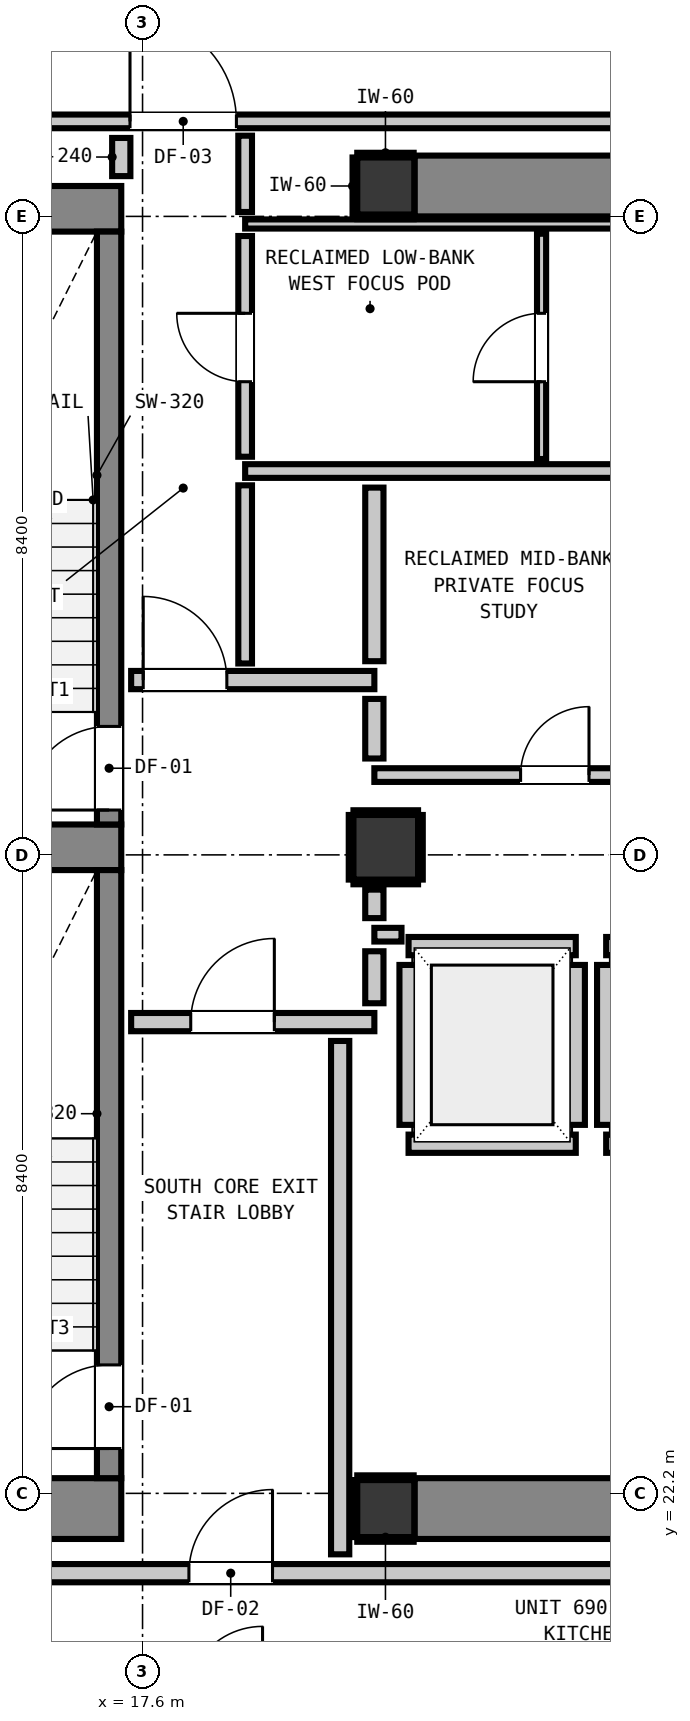
"""IFC4 building model, lengths in metres.
Left out: names, types, materials, properties, quantities, classifications, styles, units other than length and angle.
Written with IfcOpenShell. Run it as: python <this file> out.ifc"""

import sys

from ifc_helpers import new_model, si_unit, direction, frame, frame_2d, origin, origin_2d, place, context, subcontext, project, spatial, rectangle, extrude, element, fill, save


model = new_model("IFC4")
c1 = context("Model", 3, precision=1e-05, world=origin(), true_north=direction((0.0, 1.0)))
c2 = subcontext(c1, "Body", "Model", "MODEL_VIEW")
j1 = project(units=[si_unit("LENGTHUNIT", "METRE"), si_unit("PLANEANGLEUNIT", "RADIAN")], contexts=[c1])
p1 = place(None, origin())
s1 = spatial("IfcSite", under=j1, at=p1, CompositionType="ELEMENT")
p2 = place(p1, origin())
s2 = spatial("IfcBuilding", under=s1, at=p2, CompositionType="ELEMENT")
p3 = place(p2, frame((0.0, 0.0, 237.92)))
s3 = spatial("IfcBuildingStorey", under=s2, at=p3, CompositionType="ELEMENT", Elevation=237.92)
for number, where, z_axis, x_axis in (
    (1, (20.8, 22.0, 0.0), (0.0, 0.0, 1.0), (1.0, 0.0, 0.0)),
    (2, (20.8, 39.4, 0.0), (0.0, 0.0, 1.0), (1.0, 0.0, 0.0)),
):
    element("IfcColumn", number, at=place(p3, frame(where, z_axis=z_axis, x_axis=x_axis)), inside=s3, PredefinedType="COLUMN", context=c2, shape_type="SweptSolid", body=[
        extrude(rectangle(XDim=0.75, YDim=0.75, at=origin_2d()), origin(), (0.0, 0.0, 1.0), 3.32),
    ])
p4 = place(p3, frame((13.24, 22.0, 0.0), z_axis=(0.0, 0.0, 1.0), x_axis=(1.0, 0.0, 0.0)))
e3 = element("IfcWall", 3, at=p4, inside=s3, PredefinedType="SHEAR", context=c2, shape_type="SweptSolid", body=[
    extrude(rectangle(XDim=4.08, YDim=0.8, at=frame_2d((2.04, 0.0))), origin(), (0.0, 0.0, 1.0), 3.32),
])
p5 = place(p3, frame((13.24, 39.1, 0.0), z_axis=(0.0, 0.0, 1.0), x_axis=(1.0, 0.0, 0.0)))
e4 = element("IfcWall", 4, at=p5, inside=s3, PredefinedType="SHEAR", context=c2, shape_type="SweptSolid", body=[
    extrude(rectangle(XDim=4.08, YDim=0.6, at=frame_2d((2.04, 0.0))), origin(), (0.0, 0.0, 1.0), 3.32),
])
p6 = place(p3, frame((13.78, 30.7, 0.0), z_axis=(0.0, 0.0, 1.0), x_axis=(1.0, 0.0, 0.0)))
e5 = element("IfcWall", 5, at=p6, inside=s3, PredefinedType="SHEAR", context=c2, shape_type="SweptSolid", body=[
    extrude(rectangle(XDim=3.54, YDim=0.6, at=frame_2d((1.77, 0.0))), origin(), (0.0, 0.0, 1.0), 3.32),
])
for number, where, z_axis, x_axis in (
    (6, (21.18, 22.0, 0.0), (0.0, 0.0, 1.0), (1.0, 0.0, 0.0)),
    (7, (21.18, 39.4, 0.0), (0.0, 0.0, 1.0), (1.0, 0.0, 0.0)),
):
    element("IfcWall", number, at=place(p3, frame(where, z_axis=z_axis, x_axis=x_axis)), inside=s3, PredefinedType="SHEAR", context=c2, shape_type="SweptSolid", body=[
        extrude(rectangle(XDim=7.64, YDim=0.8, at=frame_2d((3.82, 0.0))), origin(), (0.0, 0.0, 1.0), 3.32),
    ])
p7 = place(p3, frame((17.16, 31.0, 0.0), z_axis=(0.0, 0.0, 1.0), x_axis=(0.0, 1.0, 0.0)))
e8 = element("IfcWall", 8, at=p7, inside=s3, PredefinedType="SHEAR", context=c2, shape_type="SweptSolid", body=[
    extrude(rectangle(XDim=7.8, YDim=0.32, at=frame_2d((3.9, 0.0))), origin(), (0.0, 0.0, 1.0), 3.32),
])
p8 = place(p7, frame((0.19, 0.0, 0.0)))
e9 = element("IfcOpeningElement", 9, at=p8, cuts=e8, PredefinedType="OPENING", context=c2, shape_type="SweptSolid", body=[
    extrude(rectangle(XDim=1.1, YDim=2.15, at=frame_2d((0.55, 1.075))), frame((0.0, 0.17, 0.0), z_axis=(0.0, -1.0, 0.0), x_axis=(1.0, 0.0, 0.0)), (0.0, 0.0, 1.0), 0.34),
])
p9 = place(p3, frame((17.16, 22.4, 0.0), z_axis=(0.0, 0.0, 1.0), x_axis=(0.0, 1.0, 0.0)))
e10 = element("IfcWall", 10, at=p9, inside=s3, PredefinedType="SHEAR", context=c2, shape_type="SweptSolid", body=[
    extrude(rectangle(XDim=8.0, YDim=0.32, at=frame_2d((4.0, 0.0))), origin(), (0.0, 0.0, 1.0), 3.32),
])
p10 = place(p9, frame((0.39, 0.0, 0.0)))
e11 = element("IfcOpeningElement", 11, at=p10, cuts=e10, PredefinedType="OPENING", context=c2, shape_type="SweptSolid", body=[
    extrude(rectangle(XDim=1.1, YDim=2.15, at=frame_2d((0.55, 1.075))), frame((0.0, 0.17, 0.0), z_axis=(0.0, -1.0, 0.0), x_axis=(1.0, 0.0, 0.0)), (0.0, 0.0, 1.0), 0.34),
])
p11 = place(p3, frame((20.8, 30.7, 0.0), z_axis=(0.0, 0.0, 1.0), x_axis=(1.0, 0.0, 0.0)))
e12 = element("IfcColumn", 12, at=p11, inside=s3, PredefinedType="COLUMN", context=c2, shape_type="SweptSolid", body=[
    extrude(rectangle(XDim=0.85, YDim=0.85, at=origin_2d()), origin(), (0.0, 0.0, 1.0), 3.32),
])
for number, where, z_axis, x_axis in (
    (13, (21.1, 26.8, 0.0), (0.0, 0.0, 1.0), (1.0, 0.0, 0.0)),
    (14, (21.1, 29.4, 0.0), (0.0, 0.0, 1.0), (1.0, 0.0, 0.0)),
):
    element("IfcWall", number, at=place(p3, frame(where, z_axis=z_axis, x_axis=x_axis)), inside=s3, PredefinedType="PARTITIONING", context=c2, shape_type="SweptSolid", body=[
        extrude(rectangle(XDim=2.2, YDim=0.24, at=frame_2d((1.1, 0.0))), origin(), (0.0, 0.0, 1.0), 3.1),
    ])
p12 = place(p3, frame((21.1, 27.048, 0.0), z_axis=(0.0, 0.0, 1.0), x_axis=(0.0, 1.0, 0.0)))
e15 = element("IfcWall", 15, at=p12, inside=s3, PredefinedType="PARTITIONING", context=c2, shape_type="SweptSolid", body=[
    extrude(rectangle(XDim=2.104, YDim=0.24, at=frame_2d((1.052, 0.0))), origin(), (0.0, 0.0, 1.0), 2.335),
])
p13 = place(p3, frame((23.3, 27.048, 0.0), z_axis=(0.0, 0.0, 1.0), x_axis=(0.0, 1.0, 0.0)))
e16 = element("IfcWall", 16, at=p13, inside=s3, PredefinedType="PARTITIONING", context=c2, shape_type="SweptSolid", body=[
    extrude(rectangle(XDim=2.104, YDim=0.24, at=frame_2d((1.052, 0.0))), origin(), (0.0, 0.0, 1.0), 3.1),
])
for number, where, z_axis, x_axis in (
    (17, (23.7, 26.8, 0.0), (0.0, 0.0, 1.0), (1.0, 0.0, 0.0)),
    (18, (23.7, 29.4, 0.0), (0.0, 0.0, 1.0), (1.0, 0.0, 0.0)),
):
    element("IfcWall", number, at=place(p3, frame(where, z_axis=z_axis, x_axis=x_axis)), inside=s3, PredefinedType="PARTITIONING", context=c2, shape_type="SweptSolid", body=[
        extrude(rectangle(XDim=2.2, YDim=0.24, at=frame_2d((1.1, 0.0))), origin(), (0.0, 0.0, 1.0), 3.1),
    ])
p14 = place(p3, frame((23.7, 27.048, 0.0), z_axis=(0.0, 0.0, 1.0), x_axis=(0.0, 1.0, 0.0)))
e19 = element("IfcWall", 19, at=p14, inside=s3, PredefinedType="PARTITIONING", context=c2, shape_type="SweptSolid", body=[
    extrude(rectangle(XDim=2.104, YDim=0.24, at=frame_2d((1.052, 0.0))), origin(), (0.0, 0.0, 1.0), 3.1),
])
p15 = place(p3, frame((10.787, 21.15, 0.0), z_axis=(0.0, 0.0, 1.0), x_axis=(1.0, 0.0, 0.0)))
e20 = element("IfcWall", 20, at=p15, inside=s3, PredefinedType="PARTITIONING", context=c2, shape_type="SweptSolid", body=[
    extrude(rectangle(XDim=26.102, YDim=0.24, at=frame_2d((13.051, 0.0))), origin(), (0.0, 0.0, 1.0), 3.1),
])
p16 = place(p15, frame((7.423, 0.0, 0.0)))
e21 = element("IfcOpeningElement", 21, at=p16, cuts=e20, PredefinedType="OPENING", context=c2, shape_type="SweptSolid", body=[
    extrude(rectangle(XDim=1.1, YDim=2.15, at=frame_2d((0.55, 1.075))), frame((0.0, 0.13, 0.0), z_axis=(0.0, -1.0, 0.0), x_axis=(1.0, 0.0, 0.0)), (0.0, 0.0, 1.0), 0.26),
])
p17 = place(p3, frame((17.45, 28.4, 0.0), z_axis=(0.0, 0.0, 1.0), x_axis=(1.0, 0.0, 0.0)))
e22 = element("IfcWall", 22, at=p17, inside=s3, PredefinedType="PARTITIONING", context=c2, shape_type="SweptSolid", body=[
    extrude(rectangle(XDim=3.2, YDim=0.24, at=frame_2d((1.6, 0.0))), origin(), (0.0, 0.0, 1.0), 3.1),
])
p18 = place(p17, frame((0.784, 0.0, 0.0)))
e23 = element("IfcOpeningElement", 23, at=p18, cuts=e22, PredefinedType="OPENING", context=c2, shape_type="SweptSolid", body=[
    extrude(rectangle(XDim=1.1, YDim=2.15, at=frame_2d((0.55, 1.075))), frame((0.0, 0.13, 0.0), z_axis=(0.0, -1.0, 0.0), x_axis=(1.0, 0.0, 0.0)), (0.0, 0.0, 1.0), 0.26),
])
p19 = place(p3, frame((17.45, 32.9, 0.0), z_axis=(0.0, 0.0, 1.0), x_axis=(1.0, 0.0, 0.0)))
e24 = element("IfcWall", 24, at=p19, inside=s3, PredefinedType="PARTITIONING", context=c2, shape_type="SweptSolid", body=[
    extrude(rectangle(XDim=3.2, YDim=0.24, at=frame_2d((1.6, 0.0))), origin(), (0.0, 0.0, 1.0), 3.1),
])
p20 = place(p19, frame((0.159, 0.0, 0.0)))
e25 = element("IfcOpeningElement", 25, at=p20, cuts=e24, PredefinedType="OPENING", context=c2, shape_type="SweptSolid", body=[
    extrude(rectangle(XDim=1.1, YDim=2.15, at=frame_2d((0.55, 1.075))), frame((0.0, 0.13, 0.0), z_axis=(0.0, -1.0, 0.0), x_axis=(1.0, 0.0, 0.0)), (0.0, 0.0, 1.0), 0.26),
])
p21 = place(p3, frame((20.65, 29.55, 0.0), z_axis=(0.0, 0.0, 1.0), x_axis=(1.0, 0.0, 0.0)))
e26 = element("IfcWall", 26, at=p21, inside=s3, PredefinedType="PARTITIONING", context=c2, shape_type="SweptSolid", body=[
    extrude(rectangle(XDim=0.357, YDim=0.18, at=frame_2d((0.179, 0.0))), origin(), (0.0, 0.0, 1.0), 3.1),
])
p22 = place(p3, frame((20.65, 31.65, 0.0), z_axis=(0.0, 0.0, 1.0), x_axis=(1.0, 0.0, 0.0)))
e27 = element("IfcWall", 27, at=p22, inside=s3, PredefinedType="PARTITIONING", context=c2, shape_type="SweptSolid", body=[
    extrude(rectangle(XDim=7.7, YDim=0.18, at=frame_2d((3.85, 0.0))), origin(), (0.0, 0.0, 1.0), 3.1),
])
p23 = place(p22, frame((1.924, 0.0, 0.0)))
e28 = element("IfcOpeningElement", 28, at=p23, cuts=e27, PredefinedType="OPENING", context=c2, shape_type="SweptSolid", body=[
    extrude(rectangle(XDim=0.9, YDim=2.1, at=frame_2d((0.45, 1.05))), frame((0.0, 0.1, 0.0), z_axis=(0.0, -1.0, 0.0), x_axis=(1.0, 0.0, 0.0)), (0.0, 0.0, 1.0), 0.2),
])
p24 = place(p3, frame((18.95, 35.65, 0.0), z_axis=(0.0, 0.0, 1.0), x_axis=(1.0, 0.0, 0.0)))
e29 = element("IfcWall", 29, at=p24, inside=s3, PredefinedType="PARTITIONING", context=c2, shape_type="SweptSolid", body=[
    extrude(rectangle(XDim=11.025, YDim=0.18, at=frame_2d((5.513, 0.0))), origin(), (0.0, 0.0, 1.0), 3.1),
])
p25 = place(p3, frame((10.787, 40.25, 0.0), z_axis=(0.0, 0.0, 1.0), x_axis=(1.0, 0.0, 0.0)))
e30 = element("IfcWall", 30, at=p25, inside=s3, PredefinedType="PARTITIONING", context=c2, shape_type="SweptSolid", body=[
    extrude(rectangle(XDim=36.626, YDim=0.18, at=frame_2d((18.313, 0.0))), origin(), (0.0, 0.0, 1.0), 3.1),
])
p26 = place(p25, frame((6.648, 0.0, 0.0)))
e31 = element("IfcOpeningElement", 31, at=p26, cuts=e30, PredefinedType="OPENING", context=c2, shape_type="SweptSolid", body=[
    extrude(rectangle(XDim=1.4, YDim=2.15, at=frame_2d((0.7, 1.075))), frame((0.0, 0.1, 0.0), z_axis=(0.0, -1.0, 0.0), x_axis=(1.0, 0.0, 0.0)), (0.0, 0.0, 1.0), 0.2),
])
p27 = place(p25, frame((31.482, 0.0, 0.0)))
e32 = element("IfcOpeningElement", 32, at=p27, cuts=e30, PredefinedType="OPENING", context=c2, shape_type="SweptSolid", body=[
    extrude(rectangle(XDim=1.0, YDim=2.15, at=frame_2d((0.5, 1.075))), frame((0.0, 0.1, 0.0), z_axis=(0.0, -1.0, 0.0), x_axis=(1.0, 0.0, 0.0)), (0.0, 0.0, 1.0), 0.2),
])
p28 = place(p3, frame((18.95, 38.9, 0.0), z_axis=(0.0, 0.0, 1.0), x_axis=(1.0, 0.0, 0.0)))
e33 = element("IfcWall", 33, at=p28, inside=s3, PredefinedType="PARTITIONING", context=c2, shape_type="SweptSolid", body=[
    extrude(rectangle(XDim=11.025, YDim=0.12, at=frame_2d((5.513, 0.0))), origin(), (0.0, 0.0, 1.0), 3.1),
])
p29 = place(p3, frame((17.32, 39.53, 0.0), z_axis=(0.0, 0.0, 1.0), x_axis=(0.0, 1.0, 0.0)))
e34 = element("IfcWall", 34, at=p29, inside=s3, PredefinedType="PARTITIONING", context=c2, shape_type="SweptSolid", body=[
    extrude(rectangle(XDim=0.502, YDim=0.24, at=frame_2d((0.251, 0.0))), origin(), (0.0, 0.0, 1.0), 3.1),
])
p30 = place(p3, frame((20.2, 21.398, 0.0), z_axis=(0.0, 0.0, 1.0), x_axis=(0.0, 1.0, 0.0)))
e35 = element("IfcWall", 35, at=p30, inside=s3, PredefinedType="PARTITIONING", context=c2, shape_type="SweptSolid", body=[
    extrude(rectangle(XDim=6.754, YDim=0.24, at=frame_2d((3.377, 0.0))), origin(), (0.0, 0.0, 1.0), 3.1),
])
p31 = place(p3, frame((20.65, 28.648, 0.0), z_axis=(0.0, 0.0, 1.0), x_axis=(0.0, 1.0, 0.0)))
e36 = element("IfcWall", 36, at=p31, inside=s3, PredefinedType="PARTITIONING", context=c2, shape_type="SweptSolid", body=[
    extrude(rectangle(XDim=0.684, YDim=0.24, at=frame_2d((0.342, 0.0))), origin(), (0.0, 0.0, 1.0), 2.335),
])
p32 = place(p3, frame((20.65, 29.768, 0.0), z_axis=(0.0, 0.0, 1.0), x_axis=(0.0, 1.0, 0.0)))
e37 = element("IfcWall", 37, at=p32, inside=s3, PredefinedType="PARTITIONING", context=c2, shape_type="SweptSolid", body=[
    extrude(rectangle(XDim=0.375, YDim=0.24, at=frame_2d((0.188, 0.0))), origin(), (0.0, 0.0, 1.0), 2.335),
])
p33 = place(p3, frame((20.65, 31.868, 0.0), z_axis=(0.0, 0.0, 1.0), x_axis=(0.0, 1.0, 0.0)))
e38 = element("IfcWall", 38, at=p33, inside=s3, PredefinedType="PARTITIONING", context=c2, shape_type="SweptSolid", body=[
    extrude(rectangle(XDim=0.784, YDim=0.24, at=frame_2d((0.392, 0.0))), origin(), (0.0, 0.0, 1.0), 2.335),
])
p34 = place(p3, frame((20.65, 33.148, 0.0), z_axis=(0.0, 0.0, 1.0), x_axis=(0.0, 1.0, 0.0)))
e39 = element("IfcWall", 39, at=p34, inside=s3, PredefinedType="PARTITIONING", context=c2, shape_type="SweptSolid", body=[
    extrude(rectangle(XDim=2.284, YDim=0.24, at=frame_2d((1.142, 0.0))), origin(), (0.0, 0.0, 1.0), 2.335),
])
p35 = place(p3, frame((18.95, 33.118, 0.0), z_axis=(0.0, 0.0, 1.0), x_axis=(0.0, 1.0, 0.0)))
e40 = element("IfcWall", 40, at=p35, inside=s3, PredefinedType="PARTITIONING", context=c2, shape_type="SweptSolid", body=[
    extrude(rectangle(XDim=2.344, YDim=0.18, at=frame_2d((1.172, 0.0))), origin(), (0.0, 0.0, 1.0), 3.1),
])
p36 = place(p3, frame((18.95, 35.838, 0.0), z_axis=(0.0, 0.0, 1.0), x_axis=(0.0, 1.0, 0.0)))
e41 = element("IfcWall", 41, at=p36, inside=s3, PredefinedType="PARTITIONING", context=c2, shape_type="SweptSolid", body=[
    extrude(rectangle(XDim=2.904, YDim=0.18, at=frame_2d((1.452, 0.0))), origin(), (0.0, 0.0, 1.0), 3.1),
])
p37 = place(p36, frame((0.987, 0.0, 0.0)))
e42 = element("IfcOpeningElement", 42, at=p37, cuts=e41, PredefinedType="OPENING", context=c2, shape_type="SweptSolid", body=[
    extrude(rectangle(XDim=0.9, YDim=2.1, at=frame_2d((0.45, 1.05))), frame((0.0, 0.1, 0.0), z_axis=(0.0, -1.0, 0.0), x_axis=(1.0, 0.0, 0.0)), (0.0, 0.0, 1.0), 0.2),
])
p38 = place(p3, frame((18.95, 39.058, 0.0), z_axis=(0.0, 0.0, 1.0), x_axis=(0.0, 1.0, 0.0)))
e43 = element("IfcWall", 43, at=p38, inside=s3, PredefinedType="PARTITIONING", context=c2, shape_type="SweptSolid", body=[
    extrude(rectangle(XDim=1.004, YDim=0.18, at=frame_2d((0.502, 0.0))), origin(), (0.0, 0.0, 1.0), 3.1),
])
p39 = place(p3, frame((22.85, 35.808, 0.0), z_axis=(0.0, 0.0, 1.0), x_axis=(0.0, 1.0, 0.0)))
e44 = element("IfcWall", 44, at=p39, inside=s3, PredefinedType="PARTITIONING", context=c2, shape_type="SweptSolid", body=[
    extrude(rectangle(XDim=2.964, YDim=0.12, at=frame_2d((1.482, 0.0))), origin(), (0.0, 0.0, 1.0), 3.1),
])
p40 = place(p39, frame((1.017, 0.0, 0.0)))
e45 = element("IfcOpeningElement", 45, at=p40, cuts=e44, PredefinedType="OPENING", context=c2, shape_type="SweptSolid", body=[
    extrude(rectangle(XDim=0.9, YDim=2.1, at=frame_2d((0.45, 1.05))), frame((0.0, 0.07, 0.0), z_axis=(0.0, -1.0, 0.0), x_axis=(1.0, 0.0, 0.0)), (0.0, 0.0, 1.0), 0.14),
])
for number, where, z_axis, x_axis in (
    (46, (20.425, 21.593, 0.0), (0.0, 0.0, 1.0), (1.0, 0.0, 0.0)),
    (47, (20.425, 22.407, 0.0), (0.0, 0.0, 1.0), (1.0, 0.0, 0.0)),
):
    element("IfcWall", number, at=place(p3, frame(where, z_axis=z_axis, x_axis=x_axis)), inside=s3, PredefinedType="PARTITIONING", context=c2, shape_type="SweptSolid", body=[
        extrude(rectangle(XDim=0.742, YDim=0.06, at=frame_2d((0.371, 0.0))), origin(), (0.0, 0.0, 1.0), 1.45),
    ])
p41 = place(p3, frame((20.393, 21.625, 0.0), z_axis=(0.0, 0.0, 1.0), x_axis=(0.0, 1.0, 0.0)))
e48 = element("IfcWall", 48, at=p41, inside=s3, PredefinedType="PARTITIONING", context=c2, shape_type="SweptSolid", body=[
    extrude(rectangle(XDim=0.75, YDim=0.06, at=frame_2d((0.375, 0.0))), origin(), (0.0, 0.0, 1.0), 1.45),
])
for number, where, z_axis, x_axis in (
    (49, (20.425, 38.993, 0.0), (0.0, 0.0, 1.0), (1.0, 0.0, 0.0)),
    (50, (20.425, 39.807, 0.0), (0.0, 0.0, 1.0), (1.0, 0.0, 0.0)),
):
    element("IfcWall", number, at=place(p3, frame(where, z_axis=z_axis, x_axis=x_axis)), inside=s3, PredefinedType="PARTITIONING", context=c2, shape_type="SweptSolid", body=[
        extrude(rectangle(XDim=0.742, YDim=0.06, at=frame_2d((0.371, 0.0))), origin(), (0.0, 0.0, 1.0), 1.45),
    ])
p42 = place(p3, frame((20.393, 39.025, 0.0), z_axis=(0.0, 0.0, 1.0), x_axis=(0.0, 1.0, 0.0)))
e51 = element("IfcWall", 51, at=p42, inside=s3, PredefinedType="PARTITIONING", context=c2, shape_type="SweptSolid", body=[
    extrude(rectangle(XDim=0.75, YDim=0.06, at=frame_2d((0.375, 0.0))), origin(), (0.0, 0.0, 1.0), 1.45),
])
for number, where, z_axis, x_axis in (
    (52, (20.375, 30.243, 0.0), (0.0, 0.0, 1.0), (1.0, 0.0, 0.0)),
    (53, (20.375, 31.157, 0.0), (0.0, 0.0, 1.0), (1.0, 0.0, 0.0)),
    (54, (20.343, 30.275, 0.0), (0.0, 0.0, 1.0), (0.0, 1.0, 0.0)),
    (55, (21.257, 30.275, 0.0), (0.0, 0.0, 1.0), (0.0, 1.0, 0.0)),
):
    element("IfcWall", number, at=place(p3, frame(where, z_axis=z_axis, x_axis=x_axis)), inside=s3, PredefinedType="PARTITIONING", context=c2, shape_type="SweptSolid", body=[
        extrude(rectangle(XDim=0.85, YDim=0.06, at=frame_2d((0.425, 0.0))), origin(), (0.0, 0.0, 1.0), 1.45),
    ])
p43 = place(p8, origin())
e56 = element("IfcDoor", 56, at=p43, inside=s3, OperationType="SINGLE_SWING_LEFT", PredefinedType="DOOR", context=c2, shape_type="SweptSolid", body=[
    extrude(rectangle(XDim=1.1, YDim=2.15, at=frame_2d((0.55, 1.075))), frame((0.0, 0.025, 0.0), z_axis=(0.0, -1.0, 0.0), x_axis=(1.0, 0.0, 0.0)), (0.0, 0.0, 1.0), 0.05),
])
fill(e9, e56)
p44 = place(p10, origin())
e57 = element("IfcDoor", 57, at=p44, inside=s3, OperationType="SINGLE_SWING_LEFT", PredefinedType="DOOR", context=c2, shape_type="SweptSolid", body=[
    extrude(rectangle(XDim=1.1, YDim=2.15, at=frame_2d((0.55, 1.075))), frame((0.0, 0.025, 0.0), z_axis=(0.0, -1.0, 0.0), x_axis=(1.0, 0.0, 0.0)), (0.0, 0.0, 1.0), 0.05),
])
fill(e11, e57)
p45 = place(p18, origin())
e58 = element("IfcDoor", 58, at=p45, inside=s3, OperationType="SINGLE_SWING_RIGHT", PredefinedType="DOOR", context=c2, shape_type="SweptSolid", body=[
    extrude(rectangle(XDim=1.1, YDim=2.15, at=frame_2d((0.55, 1.075))), frame((0.0, 0.025, 0.0), z_axis=(0.0, -1.0, 0.0), x_axis=(1.0, 0.0, 0.0)), (0.0, 0.0, 1.0), 0.05),
])
fill(e23, e58)
p46 = place(p20, origin())
e59 = element("IfcDoor", 59, at=p46, inside=s3, OperationType="SINGLE_SWING_LEFT", PredefinedType="DOOR", context=c2, shape_type="SweptSolid", body=[
    extrude(rectangle(XDim=1.1, YDim=2.15, at=frame_2d((0.55, 1.075))), frame((0.0, 0.025, 0.0), z_axis=(0.0, -1.0, 0.0), x_axis=(1.0, 0.0, 0.0)), (0.0, 0.0, 1.0), 0.05),
])
fill(e25, e59)
p47 = place(p16, origin())
e60 = element("IfcDoor", 60, at=p47, inside=s3, OperationType="SINGLE_SWING_RIGHT", PredefinedType="DOOR", context=c2, shape_type="SweptSolid", body=[
    extrude(rectangle(XDim=1.1, YDim=2.15, at=frame_2d((0.55, 1.075))), frame((0.0, 0.025, 0.0), z_axis=(0.0, -1.0, 0.0), x_axis=(1.0, 0.0, 0.0)), (0.0, 0.0, 1.0), 0.05),
])
fill(e21, e60)
p48 = place(p26, origin())
e61 = element("IfcDoor", 61, at=p48, inside=s3, OperationType="SINGLE_SWING_LEFT", PredefinedType="DOOR", context=c2, shape_type="SweptSolid", body=[
    extrude(rectangle(XDim=1.4, YDim=2.15, at=frame_2d((0.7, 1.075))), frame((0.0, 0.025, 0.0), z_axis=(0.0, -1.0, 0.0), x_axis=(1.0, 0.0, 0.0)), (0.0, 0.0, 1.0), 0.05),
])
fill(e31, e61)
p49 = place(p37, origin())
e62 = element("IfcDoor", 62, at=p49, inside=s3, OperationType="SINGLE_SWING_RIGHT", PredefinedType="DOOR", context=c2, shape_type="SweptSolid", body=[
    extrude(rectangle(XDim=0.9, YDim=2.1, at=frame_2d((0.45, 1.05))), frame((0.0, 0.025, 0.0), z_axis=(0.0, -1.0, 0.0), x_axis=(1.0, 0.0, 0.0)), (0.0, 0.0, 1.0), 0.05),
])
fill(e42, e62)
p50 = place(p40, origin())
e63 = element("IfcDoor", 63, at=p50, inside=s3, OperationType="SINGLE_SWING_LEFT", PredefinedType="DOOR", context=c2, shape_type="SweptSolid", body=[
    extrude(rectangle(XDim=0.9, YDim=2.1, at=frame_2d((0.45, 1.05))), frame((0.0, 0.025, 0.0), z_axis=(0.0, -1.0, 0.0), x_axis=(1.0, 0.0, 0.0)), (0.0, 0.0, 1.0), 0.05),
])
fill(e45, e63)
p51 = place(p23, origin())
e64 = element("IfcDoor", 64, at=p51, inside=s3, OperationType="SINGLE_SWING_RIGHT", PredefinedType="DOOR", context=c2, shape_type="SweptSolid", body=[
    extrude(rectangle(XDim=0.9, YDim=2.1, at=frame_2d((0.45, 1.05))), frame((0.0, 0.025, 0.0), z_axis=(0.0, -1.0, 0.0), x_axis=(1.0, 0.0, 0.0)), (0.0, 0.0, 1.0), 0.05),
])
fill(e28, e64)
save(model, sys.argv[1])
